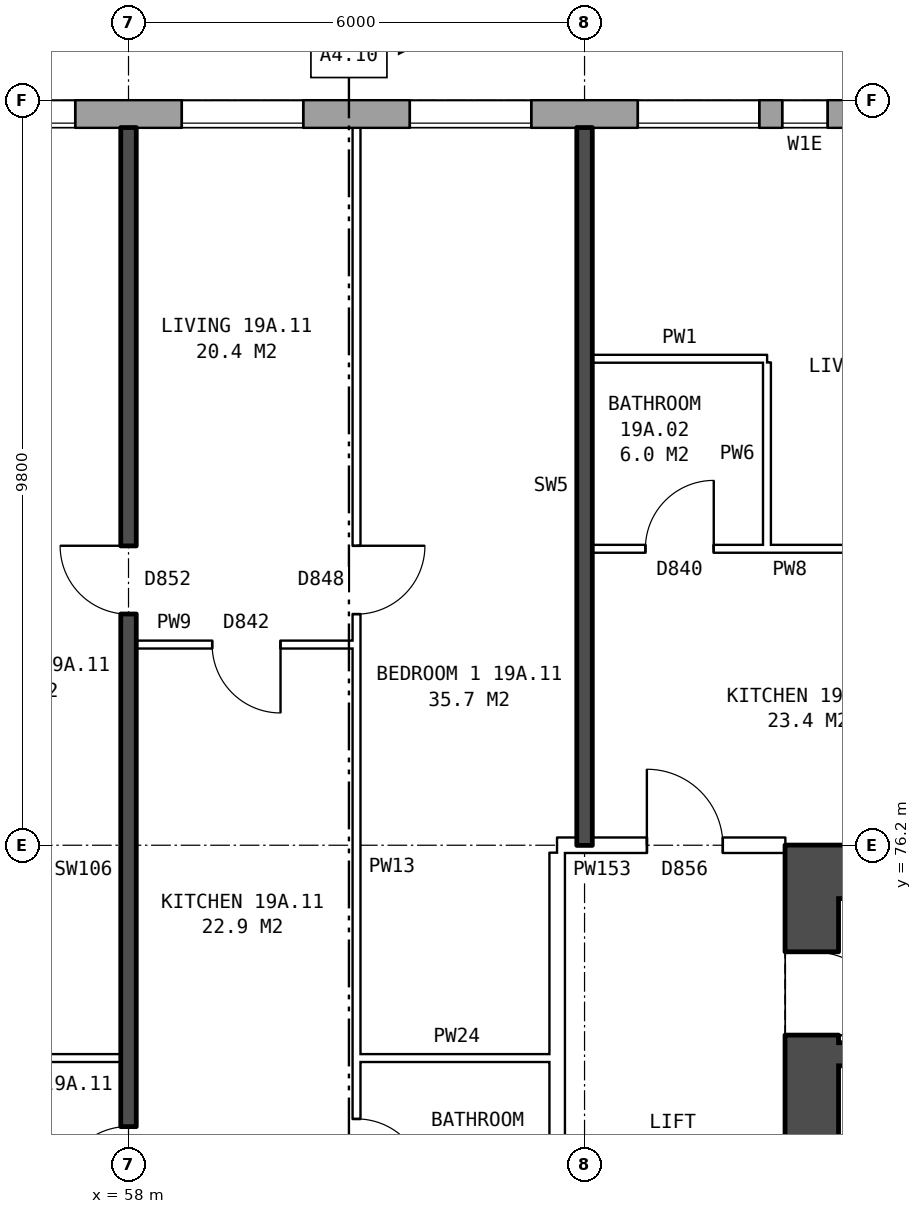
"""IFC4 building model, lengths in metres.
Left out: names, types, materials, properties, quantities, classifications, styles, units other than length and angle.
Written with IfcOpenShell. Run it as: python <this file> out.ifc"""

import sys

from ifc_helpers import new_model, si_unit, direction, frame, frame_2d, origin, place, context, subcontext, project, spatial, rectangle, extrude, element, fill, save


model = new_model("IFC4")
c1 = context("Model", 3, precision=1e-05, world=origin(), true_north=direction((0.0, 1.0)))
c2 = subcontext(c1, "Body", "Model", "MODEL_VIEW")
j1 = project(units=[si_unit("LENGTHUNIT", "METRE"), si_unit("PLANEANGLEUNIT", "RADIAN")], contexts=[c1])
p1 = place(None, origin())
s1 = spatial("IfcSite", under=j1, at=p1, CompositionType="ELEMENT")
p2 = place(p1, origin())
s2 = spatial("IfcBuilding", under=s1, at=p2, CompositionType="ELEMENT")
p3 = place(p2, frame((0.0, 0.0, 71.6)))
s3 = spatial("IfcBuildingStorey", under=s2, at=p3, CompositionType="ELEMENT", Elevation=71.6)
p4 = place(p3, frame((72.925, 85.82, 0.0), z_axis=(0.0, 0.0, 1.0), x_axis=(-1.0, 0.0, 0.0)))
e1 = element("IfcWall", 1, at=p4, inside=s3, PredefinedType="STANDARD", context=c2, shape_type="SweptSolid", body=[
    extrude(rectangle(XDim=46.601, YDim=0.36, at=frame_2d((23.3, 0.0))), origin(), (0.0, 0.0, 1.0), 2.85),
])
p5 = place(p4, frame((0.625, 0.0, 0.8)))
e2 = element("IfcOpeningElement", 2, at=p5, cuts=e1, PredefinedType="OPENING", context=c2, shape_type="SweptSolid", body=[
    extrude(rectangle(XDim=1.6, YDim=1.8, at=frame_2d((0.8, 0.9))), frame((0.0, 0.19, 0.0), z_axis=(0.0, -1.0, 0.0), x_axis=(1.0, 0.0, 0.0)), (0.0, 0.0, 1.0), 0.38),
])
p6 = place(p4, frame((4.625, 0.0, 0.8)))
e3 = element("IfcOpeningElement", 3, at=p6, cuts=e1, PredefinedType="OPENING", context=c2, shape_type="SweptSolid", body=[
    extrude(rectangle(XDim=0.8, YDim=0.9, at=frame_2d((0.4, 0.45))), frame((0.0, 0.19, 0.0), z_axis=(0.0, -1.0, 0.0), x_axis=(1.0, 0.0, 0.0)), (0.0, 0.0, 1.0), 0.38),
])
p7 = place(p4, frame((6.625, 0.0, 0.8)))
e4 = element("IfcOpeningElement", 4, at=p7, cuts=e1, PredefinedType="OPENING", context=c2, shape_type="SweptSolid", body=[
    extrude(rectangle(XDim=1.6, YDim=1.8, at=frame_2d((0.8, 0.9))), frame((0.0, 0.19, 0.0), z_axis=(0.0, -1.0, 0.0), x_axis=(1.0, 0.0, 0.0)), (0.0, 0.0, 1.0), 0.38),
])
p8 = place(p4, frame((9.625, 0.0, 0.8)))
e5 = element("IfcOpeningElement", 5, at=p8, cuts=e1, PredefinedType="OPENING", context=c2, shape_type="SweptSolid", body=[
    extrude(rectangle(XDim=1.6, YDim=1.8, at=frame_2d((0.8, 0.9))), frame((0.0, 0.19, 0.0), z_axis=(0.0, -1.0, 0.0), x_axis=(1.0, 0.0, 0.0)), (0.0, 0.0, 1.0), 0.38),
])
p9 = place(p4, frame((12.625, 0.0, 0.8)))
e6 = element("IfcOpeningElement", 6, at=p9, cuts=e1, PredefinedType="OPENING", context=c2, shape_type="SweptSolid", body=[
    extrude(rectangle(XDim=1.6, YDim=1.8, at=frame_2d((0.8, 0.9))), frame((0.0, 0.19, 0.0), z_axis=(0.0, -1.0, 0.0), x_axis=(1.0, 0.0, 0.0)), (0.0, 0.0, 1.0), 0.38),
])
p10 = place(p4, frame((15.625, 0.0, 0.8)))
e7 = element("IfcOpeningElement", 7, at=p10, cuts=e1, PredefinedType="OPENING", context=c2, shape_type="SweptSolid", body=[
    extrude(rectangle(XDim=1.6, YDim=1.8, at=frame_2d((0.8, 0.9))), frame((0.0, 0.19, 0.0), z_axis=(0.0, -1.0, 0.0), x_axis=(1.0, 0.0, 0.0)), (0.0, 0.0, 1.0), 0.38),
])
p11 = place(p4, frame((18.625, 0.0, 0.8)))
e8 = element("IfcOpeningElement", 8, at=p11, cuts=e1, PredefinedType="OPENING", context=c2, shape_type="SweptSolid", body=[
    extrude(rectangle(XDim=1.6, YDim=1.8, at=frame_2d((0.8, 0.9))), frame((0.0, 0.19, 0.0), z_axis=(0.0, -1.0, 0.0), x_axis=(1.0, 0.0, 0.0)), (0.0, 0.0, 1.0), 0.38),
])
p12 = place(p4, frame((21.625, 0.0, 0.8)))
e9 = element("IfcOpeningElement", 9, at=p12, cuts=e1, PredefinedType="OPENING", context=c2, shape_type="SweptSolid", body=[
    extrude(rectangle(XDim=1.6, YDim=1.8, at=frame_2d((0.8, 0.9))), frame((0.0, 0.19, 0.0), z_axis=(0.0, -1.0, 0.0), x_axis=(1.0, 0.0, 0.0)), (0.0, 0.0, 1.0), 0.38),
])
p13 = place(p4, frame((24.625, 0.0, 0.8)))
e10 = element("IfcOpeningElement", 10, at=p13, cuts=e1, PredefinedType="OPENING", context=c2, shape_type="SweptSolid", body=[
    extrude(rectangle(XDim=1.6, YDim=1.8, at=frame_2d((0.8, 0.9))), frame((0.0, 0.19, 0.0), z_axis=(0.0, -1.0, 0.0), x_axis=(1.0, 0.0, 0.0)), (0.0, 0.0, 1.0), 0.38),
])
p14 = place(p4, frame((27.625, 0.0, 0.8)))
e11 = element("IfcOpeningElement", 11, at=p14, cuts=e1, PredefinedType="OPENING", context=c2, shape_type="SweptSolid", body=[
    extrude(rectangle(XDim=1.6, YDim=1.8, at=frame_2d((0.8, 0.9))), frame((0.0, 0.19, 0.0), z_axis=(0.0, -1.0, 0.0), x_axis=(1.0, 0.0, 0.0)), (0.0, 0.0, 1.0), 0.38),
])
p15 = place(p4, frame((30.625, 0.0, 0.8)))
e12 = element("IfcOpeningElement", 12, at=p15, cuts=e1, PredefinedType="OPENING", context=c2, shape_type="SweptSolid", body=[
    extrude(rectangle(XDim=1.6, YDim=1.8, at=frame_2d((0.8, 0.9))), frame((0.0, 0.19, 0.0), z_axis=(0.0, -1.0, 0.0), x_axis=(1.0, 0.0, 0.0)), (0.0, 0.0, 1.0), 0.38),
])
p16 = place(p4, frame((33.625, 0.0, 0.8)))
e13 = element("IfcOpeningElement", 13, at=p16, cuts=e1, PredefinedType="OPENING", context=c2, shape_type="SweptSolid", body=[
    extrude(rectangle(XDim=1.6, YDim=1.8, at=frame_2d((0.8, 0.9))), frame((0.0, 0.19, 0.0), z_axis=(0.0, -1.0, 0.0), x_axis=(1.0, 0.0, 0.0)), (0.0, 0.0, 1.0), 0.38),
])
p17 = place(p4, frame((36.625, 0.0, 0.8)))
e14 = element("IfcOpeningElement", 14, at=p17, cuts=e1, PredefinedType="OPENING", context=c2, shape_type="SweptSolid", body=[
    extrude(rectangle(XDim=1.6, YDim=1.8, at=frame_2d((0.8, 0.9))), frame((0.0, 0.19, 0.0), z_axis=(0.0, -1.0, 0.0), x_axis=(1.0, 0.0, 0.0)), (0.0, 0.0, 1.0), 0.38),
])
p18 = place(p4, frame((39.625, 0.0, 0.8)))
e15 = element("IfcOpeningElement", 15, at=p18, cuts=e1, PredefinedType="OPENING", context=c2, shape_type="SweptSolid", body=[
    extrude(rectangle(XDim=1.6, YDim=1.8, at=frame_2d((0.8, 0.9))), frame((0.0, 0.19, 0.0), z_axis=(0.0, -1.0, 0.0), x_axis=(1.0, 0.0, 0.0)), (0.0, 0.0, 1.0), 0.38),
])
p19 = place(p4, frame((43.225, 0.0, 1.7)))
e16 = element("IfcOpeningElement", 16, at=p19, cuts=e1, PredefinedType="OPENING", context=c2, shape_type="SweptSolid", body=[
    extrude(rectangle(XDim=0.6, YDim=0.9, at=frame_2d((0.3, 0.45))), frame((0.0, 0.19, 0.0), z_axis=(0.0, -1.0, 0.0), x_axis=(1.0, 0.0, 0.0)), (0.0, 0.0, 1.0), 0.38),
])
p20 = place(p4, frame((5.725, 0.0, 0.8)))
e17 = element("IfcOpeningElement", 17, at=p20, cuts=e1, PredefinedType="OPENING", context=c2, shape_type="SweptSolid", body=[
    extrude(rectangle(XDim=0.6, YDim=1.8, at=frame_2d((0.3, 0.9))), frame((0.0, 0.19, 0.0), z_axis=(0.0, -1.0, 0.0), x_axis=(1.0, 0.0, 0.0)), (0.0, 0.0, 1.0), 0.38),
])
p21 = place(p4, frame((44.125, 0.0, 1.0)))
e18 = element("IfcOpeningElement", 18, at=p21, cuts=e1, PredefinedType="OPENING", context=c2, shape_type="SweptSolid", body=[
    extrude(rectangle(XDim=0.6, YDim=1.5, at=frame_2d((0.3, 0.75))), frame((0.0, 0.19, 0.0), z_axis=(0.0, -1.0, 0.0), x_axis=(1.0, 0.0, 0.0)), (0.0, 0.0, 1.0), 0.38),
])
p22 = place(p3, frame((66.99, 64.5, 0.0), z_axis=(0.0, 0.0, 1.0), x_axis=(0.0, 1.0, 0.0)))
e19 = element("IfcWall", 19, at=p22, inside=s3, PredefinedType="SHEAR", context=c2, shape_type="SweptSolid", body=[
    extrude(rectangle(XDim=11.0, YDim=0.7, at=frame_2d((5.5, 0.0))), origin(), (0.0, 0.0, 1.0), 2.85),
])
p23 = place(p22, frame((0.625, 0.0, 0.0)))
e20 = element("IfcOpeningElement", 20, at=p23, cuts=e19, PredefinedType="OPENING", context=c2, shape_type="SweptSolid", body=[
    extrude(rectangle(XDim=1.1, YDim=2.1, at=frame_2d((0.55, 1.05))), frame((0.0, 0.36, 0.0), z_axis=(0.0, -1.0, 0.0), x_axis=(1.0, 0.0, 0.0)), (0.0, 0.0, 1.0), 0.72),
])
p24 = place(p22, frame((9.2, 0.0, 0.0)))
e21 = element("IfcOpeningElement", 21, at=p24, cuts=e19, PredefinedType="OPENING", context=c2, shape_type="SweptSolid", body=[
    extrude(rectangle(XDim=1.1, YDim=2.1, at=frame_2d((0.55, 1.05))), frame((0.0, 0.36, 0.0), z_axis=(0.0, -1.0, 0.0), x_axis=(1.0, 0.0, 0.0)), (0.0, 0.0, 1.0), 0.72),
])
p25 = place(p3, frame((66.64, 75.85, 0.0), z_axis=(0.0, 0.0, 1.0), x_axis=(1.0, 0.0, 0.0)))
e22 = element("IfcWall", 22, at=p25, inside=s3, PredefinedType="SHEAR", context=c2, shape_type="SweptSolid", body=[
    extrude(rectangle(XDim=9.0, YDim=0.7, at=frame_2d((4.5, 0.0))), origin(), (0.0, 0.0, 1.0), 2.85),
])
p26 = place(p3, frame((67.34, 73.45, 0.0), z_axis=(0.0, 0.0, 1.0), x_axis=(1.0, 0.0, 0.0)))
e23 = element("IfcWall", 23, at=p26, inside=s3, PredefinedType="SHEAR", context=c2, shape_type="SweptSolid", body=[
    extrude(rectangle(XDim=2.2, YDim=0.3, at=frame_2d((1.1, 0.0))), origin(), (0.0, 0.0, 1.0), 2.85),
])
p27 = place(p3, frame((63.64, 63.9, 0.0), z_axis=(0.0, 0.0, 1.0), x_axis=(0.0, 1.0, 0.0)))
e24 = element("IfcWall", 24, at=p27, inside=s3, PredefinedType="PARTITIONING", context=c2, shape_type="SweptSolid", body=[
    extrude(rectangle(XDim=12.2, YDim=0.2, at=frame_2d((6.1, 0.0))), origin(), (0.0, 0.0, 1.0), 2.85),
])
p28 = place(p27, frame((5.1, 0.0, 0.0)))
e25 = element("IfcOpeningElement", 25, at=p28, cuts=e24, PredefinedType="OPENING", context=c2, shape_type="SweptSolid", body=[
    extrude(rectangle(XDim=2.0, YDim=2.1, at=frame_2d((1.0, 1.05))), frame((0.0, 0.11, 0.0), z_axis=(0.0, -1.0, 0.0), x_axis=(1.0, 0.0, 0.0)), (0.0, 0.0, 1.0), 0.22),
])
p29 = place(p3, frame((55.1, 73.4, 0.0), z_axis=(0.0, 0.0, 1.0), x_axis=(1.0, 0.0, 0.0)))
e26 = element("IfcWall", 26, at=p29, inside=s3, PredefinedType="PARTITIONING", context=c2, shape_type="SweptSolid", body=[
    extrude(rectangle(XDim=2.8, YDim=0.1, at=frame_2d((1.4, 0.0))), origin(), (0.0, 0.0, 1.0), 2.85),
])
p30 = place(p3, frame((61.0, 73.4, 0.0), z_axis=(0.0, 0.0, 1.0), x_axis=(1.0, 0.0, 0.0)))
e27 = element("IfcWall", 27, at=p30, inside=s3, PredefinedType="PARTITIONING", context=c2, shape_type="SweptSolid", body=[
    extrude(rectangle(XDim=2.64, YDim=0.1, at=frame_2d((1.32, 0.0))), origin(), (0.0, 0.0, 1.0), 2.85),
])
p31 = place(p3, frame((63.64, 76.2, 0.0), z_axis=(0.0, 0.0, 1.0), x_axis=(1.0, 0.0, 0.0)))
e28 = element("IfcWall", 28, at=p31, inside=s3, PredefinedType="PARTITIONING", context=c2, shape_type="SweptSolid", body=[
    extrude(rectangle(XDim=3.0, YDim=0.2, at=frame_2d((1.5, 0.0))), origin(), (0.0, 0.0, 1.0), 2.85),
])
p32 = place(p31, frame((1.18, 0.0, 0.0)))
e29 = element("IfcOpeningElement", 29, at=p32, cuts=e28, PredefinedType="OPENING", context=c2, shape_type="SweptSolid", body=[
    extrude(rectangle(XDim=1.0, YDim=2.1, at=frame_2d((0.5, 1.05))), frame((0.0, 0.11, 0.0), z_axis=(0.0, -1.0, 0.0), x_axis=(1.0, 0.0, 0.0)), (0.0, 0.0, 1.0), 0.22),
])
p33 = place(p3, frame((58.1, 78.84, 0.0), z_axis=(0.0, 0.0, 1.0), x_axis=(1.0, 0.0, 0.0)))
e30 = element("IfcWall", 30, at=p33, inside=s3, PredefinedType="PARTITIONING", context=c2, shape_type="SweptSolid", body=[
    extrude(rectangle(XDim=2.9, YDim=0.1, at=frame_2d((1.45, 0.0))), origin(), (0.0, 0.0, 1.0), 2.85),
])
p34 = place(p33, frame((1.0, 0.0, 0.0)))
e31 = element("IfcOpeningElement", 31, at=p34, cuts=e30, PredefinedType="OPENING", context=c2, shape_type="SweptSolid", body=[
    extrude(rectangle(XDim=0.9, YDim=2.1, at=frame_2d((0.45, 1.05))), frame((0.0, 0.06, 0.0), z_axis=(0.0, -1.0, 0.0), x_axis=(1.0, 0.0, 0.0)), (0.0, 0.0, 1.0), 0.12),
])
p35 = place(p3, frame((64.1, 80.1, 0.0), z_axis=(0.0, 0.0, 1.0), x_axis=(1.0, 0.0, 0.0)))
e32 = element("IfcWall", 32, at=p35, inside=s3, PredefinedType="PARTITIONING", context=c2, shape_type="SweptSolid", body=[
    extrude(rectangle(XDim=5.8, YDim=0.1, at=frame_2d((2.9, 0.0))), origin(), (0.0, 0.0, 1.0), 2.85),
])
p36 = place(p35, frame((3.6, 0.0, 0.0)))
e33 = element("IfcOpeningElement", 33, at=p36, cuts=e32, PredefinedType="OPENING", context=c2, shape_type="SweptSolid", body=[
    extrude(rectangle(XDim=0.9, YDim=2.1, at=frame_2d((0.45, 1.05))), frame((0.0, 0.06, 0.0), z_axis=(0.0, -1.0, 0.0), x_axis=(1.0, 0.0, 0.0)), (0.0, 0.0, 1.0), 0.12),
])
p37 = place(p35, frame((0.7, 0.0, 0.0)))
e34 = element("IfcOpeningElement", 34, at=p37, cuts=e32, PredefinedType="OPENING", context=c2, shape_type="SweptSolid", body=[
    extrude(rectangle(XDim=0.9, YDim=2.1, at=frame_2d((0.45, 1.05))), frame((0.0, 0.06, 0.0), z_axis=(0.0, -1.0, 0.0), x_axis=(1.0, 0.0, 0.0)), (0.0, 0.0, 1.0), 0.12),
])
p38 = place(p3, frame((64.1, 82.6, 0.0), z_axis=(0.0, 0.0, 1.0), x_axis=(1.0, 0.0, 0.0)))
e35 = element("IfcWall", 35, at=p38, inside=s3, PredefinedType="PARTITIONING", context=c2, shape_type="SweptSolid", body=[
    extrude(rectangle(XDim=2.3, YDim=0.1, at=frame_2d((1.15, 0.0))), origin(), (0.0, 0.0, 1.0), 2.85),
])
p39 = place(p3, frame((58.0, 71.2, 0.0), z_axis=(0.0, 0.0, 1.0), x_axis=(0.0, 1.0, 0.0)))
e36 = element("IfcWall", 36, at=p39, inside=s3, PredefinedType="SOLIDWALL", context=c2, shape_type="SweptSolid", body=[
    extrude(rectangle(XDim=14.44, YDim=0.2, at=frame_2d((7.22, 0.0))), origin(), (0.0, 0.0, 1.0), 2.85),
])
p40 = place(p39, frame((8.04, 0.0, 0.0)))
e37 = element("IfcOpeningElement", 37, at=p40, cuts=e36, PredefinedType="OPENING", context=c2, shape_type="SweptSolid", body=[
    extrude(rectangle(XDim=0.9, YDim=2.1, at=frame_2d((0.45, 1.05))), frame((0.0, 0.11, 0.0), z_axis=(0.0, -1.0, 0.0), x_axis=(1.0, 0.0, 0.0)), (0.0, 0.0, 1.0), 0.22),
])
p41 = place(p39, frame((0.4, 0.0, 0.0)))
e38 = element("IfcOpeningElement", 38, at=p41, cuts=e36, PredefinedType="OPENING", context=c2, shape_type="SweptSolid", body=[
    extrude(rectangle(XDim=0.9, YDim=2.1, at=frame_2d((0.45, 1.05))), frame((0.0, 0.11, 0.0), z_axis=(0.0, -1.0, 0.0), x_axis=(1.0, 0.0, 0.0)), (0.0, 0.0, 1.0), 0.22),
])
p42 = place(p3, frame((61.0, 71.3, 0.0), z_axis=(0.0, 0.0, 1.0), x_axis=(0.0, 1.0, 0.0)))
e39 = element("IfcWall", 39, at=p42, inside=s3, PredefinedType="PARTITIONING", context=c2, shape_type="SweptSolid", body=[
    extrude(rectangle(XDim=14.34, YDim=0.1, at=frame_2d((7.17, 0.0))), origin(), (0.0, 0.0, 1.0), 2.85),
])
p43 = place(p42, frame((7.94, 0.0, 0.0)))
e40 = element("IfcOpeningElement", 40, at=p43, cuts=e39, PredefinedType="OPENING", context=c2, shape_type="SweptSolid", body=[
    extrude(rectangle(XDim=0.9, YDim=2.1, at=frame_2d((0.45, 1.05))), frame((0.0, 0.06, 0.0), z_axis=(0.0, -1.0, 0.0), x_axis=(1.0, 0.0, 0.0)), (0.0, 0.0, 1.0), 0.12),
])
p44 = place(p42, frame((0.4, 0.0, 0.0)))
e41 = element("IfcOpeningElement", 41, at=p44, cuts=e39, PredefinedType="OPENING", context=c2, shape_type="SweptSolid", body=[
    extrude(rectangle(XDim=0.9, YDim=2.1, at=frame_2d((0.45, 1.05))), frame((0.0, 0.06, 0.0), z_axis=(0.0, -1.0, 0.0), x_axis=(1.0, 0.0, 0.0)), (0.0, 0.0, 1.0), 0.12),
])
p45 = place(p3, frame((64.0, 76.2, 0.0), z_axis=(0.0, 0.0, 1.0), x_axis=(0.0, 1.0, 0.0)))
e42 = element("IfcWall", 42, at=p45, inside=s3, PredefinedType="SOLIDWALL", context=c2, shape_type="SweptSolid", body=[
    extrude(rectangle(XDim=9.44, YDim=0.2, at=frame_2d((4.72, 0.0))), origin(), (0.0, 0.0, 1.0), 2.85),
])
p46 = place(p3, frame((66.4, 80.15, 0.0), z_axis=(0.0, 0.0, 1.0), x_axis=(0.0, 1.0, 0.0)))
e43 = element("IfcWall", 43, at=p46, inside=s3, PredefinedType="PARTITIONING", context=c2, shape_type="SweptSolid", body=[
    extrude(rectangle(XDim=2.4, YDim=0.1, at=frame_2d((1.2, 0.0))), origin(), (0.0, 0.0, 1.0), 2.85),
])
p47 = place(p7, origin())
e44 = element("IfcWindow", 44, at=p47, inside=s3, PartitioningType="SINGLE_PANEL", PredefinedType="WINDOW", context=c2, shape_type="SweptSolid", body=[
    extrude(rectangle(XDim=1.6, YDim=1.8, at=frame_2d((0.8, 0.9))), frame((0.0, 0.15, 0.0), z_axis=(0.0, -1.0, 0.0), x_axis=(1.0, 0.0, 0.0)), (0.0, 0.0, 1.0), 0.06),
])
fill(e4, e44)
p48 = place(p8, origin())
e45 = element("IfcWindow", 45, at=p48, inside=s3, PartitioningType="SINGLE_PANEL", PredefinedType="WINDOW", context=c2, shape_type="SweptSolid", body=[
    extrude(rectangle(XDim=1.6, YDim=1.8, at=frame_2d((0.8, 0.9))), frame((0.0, 0.15, 0.0), z_axis=(0.0, -1.0, 0.0), x_axis=(1.0, 0.0, 0.0)), (0.0, 0.0, 1.0), 0.06),
])
fill(e5, e45)
p49 = place(p9, origin())
e46 = element("IfcWindow", 46, at=p49, inside=s3, PartitioningType="SINGLE_PANEL", PredefinedType="WINDOW", context=c2, shape_type="SweptSolid", body=[
    extrude(rectangle(XDim=1.6, YDim=1.8, at=frame_2d((0.8, 0.9))), frame((0.0, 0.15, 0.0), z_axis=(0.0, -1.0, 0.0), x_axis=(1.0, 0.0, 0.0)), (0.0, 0.0, 1.0), 0.06),
])
fill(e6, e46)
p50 = place(p10, origin())
e47 = element("IfcWindow", 47, at=p50, inside=s3, PartitioningType="SINGLE_PANEL", PredefinedType="WINDOW", context=c2, shape_type="SweptSolid", body=[
    extrude(rectangle(XDim=1.6, YDim=1.8, at=frame_2d((0.8, 0.9))), frame((0.0, 0.15, 0.0), z_axis=(0.0, -1.0, 0.0), x_axis=(1.0, 0.0, 0.0)), (0.0, 0.0, 1.0), 0.06),
])
fill(e7, e47)
p51 = place(p24, frame((1.1, 0.0, 0.0), z_axis=(0.0, 0.0, 1.0), x_axis=(-1.0, 0.0, 0.0)))
e48 = element("IfcDoor", 48, at=p51, inside=s3, OperationType="SINGLE_SWING_RIGHT", PredefinedType="DOOR", context=c2, shape_type="SweptSolid", body=[
    extrude(rectangle(XDim=1.1, YDim=2.1, at=frame_2d((0.55, 1.05))), frame((0.0, 0.335, 0.0), z_axis=(0.0, -1.0, 0.0), x_axis=(1.0, 0.0, 0.0)), (0.0, 0.0, 1.0), 0.05),
])
fill(e21, e48)
p52 = place(p32, origin())
e49 = element("IfcDoor", 49, at=p52, inside=s3, OperationType="SINGLE_SWING_LEFT", PredefinedType="DOOR", context=c2, shape_type="SweptSolid", body=[
    extrude(rectangle(XDim=1.0, YDim=2.1, at=frame_2d((0.5, 1.05))), frame((0.0, 0.025, 0.0), z_axis=(0.0, -1.0, 0.0), x_axis=(1.0, 0.0, 0.0)), (0.0, 0.0, 1.0), 0.05),
])
fill(e29, e49)
p53 = place(p37, origin())
e50 = element("IfcDoor", 50, at=p53, inside=s3, OperationType="SINGLE_SWING_RIGHT", PredefinedType="DOOR", context=c2, shape_type="SweptSolid", body=[
    extrude(rectangle(XDim=0.9, YDim=2.1, at=frame_2d((0.45, 1.05))), frame((0.0, 0.025, 0.0), z_axis=(0.0, -1.0, 0.0), x_axis=(1.0, 0.0, 0.0)), (0.0, 0.0, 1.0), 0.05),
])
fill(e34, e50)
p54 = place(p43, frame((0.9, 0.0, 0.0), z_axis=(0.0, 0.0, 1.0), x_axis=(-1.0, 0.0, 0.0)))
e51 = element("IfcDoor", 51, at=p54, inside=s3, OperationType="SINGLE_SWING_LEFT", PredefinedType="DOOR", context=c2, shape_type="SweptSolid", body=[
    extrude(rectangle(XDim=0.9, YDim=2.1, at=frame_2d((0.45, 1.05))), frame((0.0, 0.025, 0.0), z_axis=(0.0, -1.0, 0.0), x_axis=(1.0, 0.0, 0.0)), (0.0, 0.0, 1.0), 0.05),
])
fill(e40, e51)
p55 = place(p40, origin())
e52 = element("IfcDoor", 52, at=p55, inside=s3, OperationType="SINGLE_SWING_RIGHT", PredefinedType="DOOR", context=c2, shape_type="SweptSolid", body=[
    extrude(rectangle(XDim=0.9, YDim=2.1, at=frame_2d((0.45, 1.05))), frame((0.0, 0.025, 0.0), z_axis=(0.0, -1.0, 0.0), x_axis=(1.0, 0.0, 0.0)), (0.0, 0.0, 1.0), 0.05),
])
fill(e37, e52)
p56 = place(p34, frame((0.9, 0.0, 0.0), z_axis=(0.0, 0.0, 1.0), x_axis=(-1.0, 0.0, 0.0)))
e53 = element("IfcDoor", 53, at=p56, inside=s3, OperationType="SINGLE_SWING_LEFT", PredefinedType="DOOR", context=c2, shape_type="SweptSolid", body=[
    extrude(rectangle(XDim=0.9, YDim=2.1, at=frame_2d((0.45, 1.05))), frame((0.0, 0.025, 0.0), z_axis=(0.0, -1.0, 0.0), x_axis=(1.0, 0.0, 0.0)), (0.0, 0.0, 1.0), 0.05),
])
fill(e31, e53)
p57 = place(p44, frame((0.9, 0.0, 0.0), z_axis=(0.0, 0.0, 1.0), x_axis=(-1.0, 0.0, 0.0)))
e54 = element("IfcDoor", 54, at=p57, inside=s3, OperationType="SINGLE_SWING_RIGHT", PredefinedType="DOOR", context=c2, shape_type="SweptSolid", body=[
    extrude(rectangle(XDim=0.9, YDim=2.1, at=frame_2d((0.45, 1.05))), frame((0.0, 0.025, 0.0), z_axis=(0.0, -1.0, 0.0), x_axis=(1.0, 0.0, 0.0)), (0.0, 0.0, 1.0), 0.05),
])
fill(e41, e54)
p58 = place(p41, origin())
e55 = element("IfcDoor", 55, at=p58, inside=s3, OperationType="SINGLE_SWING_LEFT", PredefinedType="DOOR", context=c2, shape_type="SweptSolid", body=[
    extrude(rectangle(XDim=0.9, YDim=2.1, at=frame_2d((0.45, 1.05))), frame((0.0, 0.025, 0.0), z_axis=(0.0, -1.0, 0.0), x_axis=(1.0, 0.0, 0.0)), (0.0, 0.0, 1.0), 0.05),
])
fill(e38, e55)
p59 = place(p20, origin())
e56 = element("IfcWindow", 56, at=p59, inside=s3, PartitioningType="SINGLE_PANEL", PredefinedType="WINDOW", context=c2, shape_type="SweptSolid", body=[
    extrude(rectangle(XDim=0.6, YDim=1.8, at=frame_2d((0.3, 0.9))), frame((0.0, 0.15, 0.0), z_axis=(0.0, -1.0, 0.0), x_axis=(1.0, 0.0, 0.0)), (0.0, 0.0, 1.0), 0.06),
])
fill(e17, e56)
save(model, sys.argv[1])
